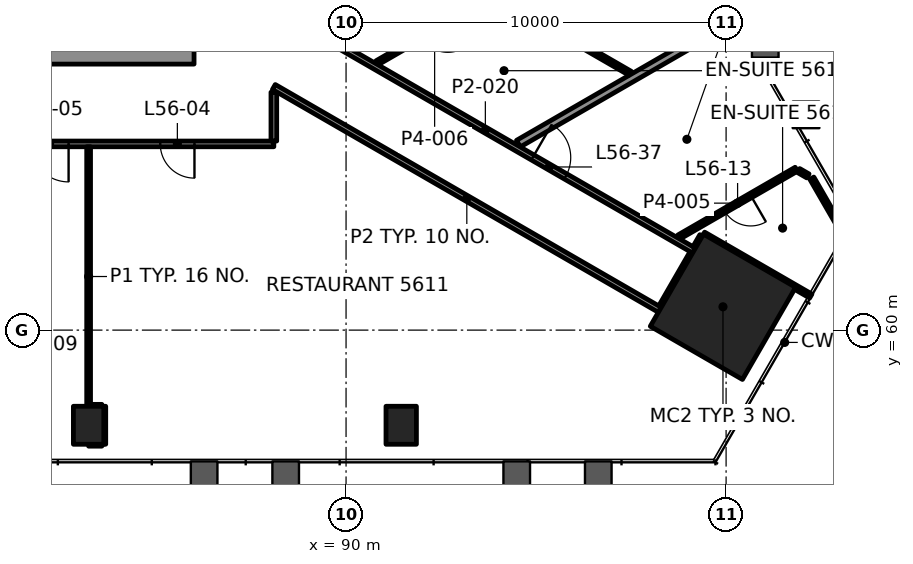
"""IFC4 building model, lengths in metres.
Left out: names, types, materials, properties, quantities, classifications, styles, units other than length and angle.
Written with IfcOpenShell. Run it as: python <this file> out.ifc"""

import sys

from ifc_helpers import new_model, si_unit, direction, frame, frame_2d, origin, origin_2d, place, context, subcontext, project, spatial, rectangle, hollow_rectangle, extrude, element, fill, save


model = new_model("IFC4")
c1 = context("Model", 3, precision=1e-05, world=origin(), true_north=direction((0.0, 1.0)))
c2 = subcontext(c1, "Body", "Model", "MODEL_VIEW")
j1 = project(units=[si_unit("LENGTHUNIT", "METRE"), si_unit("PLANEANGLEUNIT", "RADIAN")], contexts=[c1])
p1 = place(None, origin())
s1 = spatial("IfcSite", under=j1, at=p1, CompositionType="ELEMENT")
p2 = place(p1, origin())
s2 = spatial("IfcBuilding", under=s1, at=p2, CompositionType="ELEMENT")
p3 = place(p2, frame((0.0, 0.0, 237.7)))
s3 = spatial("IfcBuildingStorey", under=s2, at=p3, CompositionType="ELEMENT", Elevation=237.7)
p4 = place(p3, frame((99.918, 60.614, 0.0), z_axis=(0.0, 0.0, 1.0), x_axis=(0.5, 0.866025403784, 0.0)))
e1 = element("IfcColumn", 1, at=p4, inside=s3, PredefinedType="COLUMN", context=c2, shape_type="SweptSolid", body=[
    extrude(rectangle(XDim=2.8, YDim=2.8, at=origin_2d()), origin(), (0.0, 0.0, 1.0), 3.9),
])
for number, where, z_axis, x_axis in (
    (2, (83.226, 57.496, -0.0), (0.0, 0.0, 1.0), (1.0, 0.0, 0.0)),
    (3, (91.451, 57.496, -0.0), (0.0, 0.0, 1.0), (1.0, 0.0, 0.0)),
):
    element("IfcColumn", number, at=place(p3, frame(where, z_axis=z_axis, x_axis=x_axis)), inside=s3, PredefinedType="COLUMN", context=c2, shape_type="SweptSolid", body=[
        extrude(hollow_rectangle(XDim=0.8, YDim=1.0, WallThickness=0.05, at=origin_2d()), origin(), (0.0, 0.0, 1.0), 3.9),
    ])
p5 = place(p3, frame((64.0, 67.375, 0.0), z_axis=(0.0, 0.0, 1.0), x_axis=(1.0, 0.0, 0.0)))
e4 = element("IfcWall", 4, at=p5, inside=s3, PredefinedType="SHEAR", context=c2, shape_type="SweptSolid", body=[
    extrude(rectangle(XDim=22.0, YDim=0.75, at=frame_2d((11.0, 0.0))), origin(), (0.0, 0.0, 1.0), 3.6),
])
p6 = place(p5, frame((1.575, 0.0, 0.0)))
e5 = element("IfcOpeningElement", 5, at=p6, cuts=e4, PredefinedType="OPENING", context=c2, shape_type="SweptSolid", body=[
    extrude(rectangle(XDim=0.9, YDim=2.1, at=frame_2d((0.45, 1.05))), frame((0.0, 0.385, 0.0), z_axis=(0.0, -1.0, 0.0), x_axis=(1.0, 0.0, 0.0)), (0.0, 0.0, 1.0), 0.77),
])
p7 = place(p5, frame((4.425, 0.0, 0.0)))
e6 = element("IfcOpeningElement", 6, at=p7, cuts=e4, PredefinedType="OPENING", context=c2, shape_type="SweptSolid", body=[
    extrude(rectangle(XDim=0.9, YDim=2.1, at=frame_2d((0.45, 1.05))), frame((0.0, 0.385, 0.0), z_axis=(0.0, -1.0, 0.0), x_axis=(1.0, 0.0, 0.0)), (0.0, 0.0, 1.0), 0.77),
])
p8 = place(p3, frame((83.226, 56.996, 0.0), z_axis=(0.0, 0.0, 1.0), x_axis=(1.0, 0.0, 0.0)))
e7 = element("IfcWall", 7, at=p8, inside=s3, PredefinedType="PARTITIONING", context=c2, shape_type="SweptSolid", body=[
    extrude(rectangle(XDim=0.349, YDim=0.1, at=frame_2d((0.175, 0.0))), origin(), (0.0, 0.0, 1.0), 3.0),
])
p9 = place(p3, frame((83.286, 57.996, 0.0), z_axis=(0.0, 0.0, 1.0), x_axis=(1.0, 0.0, 0.0)))
e8 = element("IfcWall", 8, at=p9, inside=s3, PredefinedType="PARTITIONING", context=c2, shape_type="SweptSolid", body=[
    extrude(rectangle(XDim=0.289, YDim=0.1, at=frame_2d((0.145, 0.0))), origin(), (0.0, 0.0, 1.0), 3.0),
])
p10 = place(p3, frame((88.099, 64.9, 0.0), z_axis=(0.0, 0.0, 1.0), x_axis=(-1.0, 0.0, 0.0)))
e9 = element("IfcWall", 9, at=p10, inside=s3, PredefinedType="PARTITIONING", context=c2, shape_type="SweptSolid", body=[
    extrude(rectangle(XDim=26.199, YDim=0.15, at=frame_2d((13.1, 0.0))), origin(), (0.0, 0.0, 1.0), 3.0),
])
p11 = place(p10, frame((2.088, 0.0, 0.0)))
e10 = element("IfcOpeningElement", 10, at=p11, cuts=e9, PredefinedType="OPENING", context=c2, shape_type="SweptSolid", body=[
    extrude(rectangle(XDim=0.9, YDim=2.1, at=frame_2d((0.45, 1.05))), frame((0.0, 0.085, 0.0), z_axis=(0.0, -1.0, 0.0), x_axis=(1.0, 0.0, 0.0)), (0.0, 0.0, 1.0), 0.17),
])
p12 = place(p10, frame((5.4, 0.0, 0.0)))
e11 = element("IfcOpeningElement", 11, at=p12, cuts=e9, PredefinedType="OPENING", context=c2, shape_type="SweptSolid", body=[
    extrude(rectangle(XDim=1.0, YDim=2.1, at=frame_2d((0.5, 1.05))), frame((0.0, 0.085, 0.0), z_axis=(0.0, -1.0, 0.0), x_axis=(1.0, 0.0, 0.0)), (0.0, 0.0, 1.0), 0.17),
])
p13 = place(p10, frame((17.946, 0.0, 0.0)))
e12 = element("IfcOpeningElement", 12, at=p13, cuts=e9, PredefinedType="OPENING", context=c2, shape_type="SweptSolid", body=[
    extrude(rectangle(XDim=1.0, YDim=2.1, at=frame_2d((0.5, 1.05))), frame((0.0, 0.085, 0.0), z_axis=(0.0, -1.0, 0.0), x_axis=(1.0, 0.0, 0.0)), (0.0, 0.0, 1.0), 0.17),
])
p14 = place(p10, frame((24.395, 0.0, 0.0)))
e13 = element("IfcOpeningElement", 13, at=p14, cuts=e9, PredefinedType="OPENING", context=c2, shape_type="SweptSolid", body=[
    extrude(rectangle(XDim=1.0, YDim=2.1, at=frame_2d((0.5, 1.05))), frame((0.0, 0.085, 0.0), z_axis=(0.0, -1.0, 0.0), x_axis=(1.0, 0.0, 0.0)), (0.0, 0.0, 1.0), 0.17),
])
p15 = place(p3, frame((101.848, 64.234, 0.0), z_axis=(0.0, 0.0, 1.0), x_axis=(-0.865998731726, -0.500046194516, 0.0)))
e14 = element("IfcWall", 14, at=p15, inside=s3, PredefinedType="PARTITIONING", context=c2, shape_type="SweptSolid", body=[
    extrude(rectangle(XDim=3.569, YDim=0.12, at=frame_2d((1.784, 0.0))), origin(), (0.0, 0.0, 1.0), 3.0),
])
p16 = place(p15, frame((1.384, 0.0, 0.0)))
e15 = element("IfcOpeningElement", 15, at=p16, cuts=e14, PredefinedType="OPENING", context=c2, shape_type="SweptSolid", body=[
    extrude(rectangle(XDim=0.8, YDim=2.1, at=frame_2d((0.4, 1.05))), frame((0.0, 0.07, 0.0), z_axis=(0.0, -1.0, 0.0), x_axis=(1.0, 0.0, 0.0)), (0.0, 0.0, 1.0), 0.14),
])
p17 = place(p3, frame((94.535, 64.907, 0.0), z_axis=(0.0, 0.0, 1.0), x_axis=(0.866024015056, 0.50000240534, 0.0)))
e16 = element("IfcWall", 16, at=p17, inside=s3, PredefinedType="PARTITIONING", context=c2, shape_type="SweptSolid", body=[
    extrude(rectangle(XDim=6.593, YDim=0.2, at=frame_2d((3.296, 0.0))), origin(), (0.0, 0.0, 1.0), 3.0),
])
p18 = place(p3, frame((93.846, 68.784, 0.0), z_axis=(0.0, 0.0, 1.0), x_axis=(-0.865997352085, -0.500048583822, 0.0)))
e17 = element("IfcWall", 17, at=p18, inside=s3, PredefinedType="PARTITIONING", context=c2, shape_type="SweptSolid", body=[
    extrude(rectangle(XDim=3.499, YDim=0.12, at=frame_2d((1.75, 0.0))), origin(), (0.0, 0.0, 1.0), 3.0),
])
p19 = place(p18, frame((1.35, 0.0, 0.0)))
e18 = element("IfcOpeningElement", 18, at=p19, cuts=e17, PredefinedType="OPENING", context=c2, shape_type="SweptSolid", body=[
    extrude(rectangle(XDim=0.8, YDim=2.1, at=frame_2d((0.4, 1.05))), frame((0.0, 0.07, 0.0), z_axis=(0.0, -1.0, 0.0), x_axis=(1.0, 0.0, 0.0)), (0.0, 0.0, 1.0), 0.14),
])
p20 = place(p3, frame((98.293, 60.6, 0.0), z_axis=(0.0, 0.0, 1.0), x_axis=(0.499927431592, 0.866067297121, 0.0)))
e19 = element("IfcWall", 19, at=p20, inside=s3, PredefinedType="PARTITIONING", context=c2, shape_type="SweptSolid", body=[
    extrude(rectangle(XDim=1.65, YDim=0.15, at=frame_2d((0.825, 0.0))), origin(), (0.0, 0.0, 1.0), 2.847),
])
p21 = place(p3, frame((88.1, 64.976, 0.0), z_axis=(0.0, 0.0, 1.0), x_axis=(0.0, 1.0, 0.0)))
e20 = element("IfcWall", 20, at=p21, inside=s3, PredefinedType="PARTITIONING", context=c2, shape_type="SweptSolid", body=[
    extrude(rectangle(XDim=1.285, YDim=0.15, at=frame_2d((0.643, 0.0))), origin(), (0.0, 0.0, 1.0), 2.847),
])
p22 = place(p3, frame((83.626, 56.997, 0.0), z_axis=(0.0, 0.0, 1.0), x_axis=(0.0, 1.0, 0.0)))
e21 = element("IfcWall", 21, at=p22, inside=s3, PredefinedType="PARTITIONING", context=c2, shape_type="SweptSolid", body=[
    extrude(rectangle(XDim=0.999, YDim=0.1, at=frame_2d((0.5, 0.0))), origin(), (0.0, 0.0, 1.0), 2.922),
])
p23 = place(p3, frame((83.226, 57.996, 0.0), z_axis=(0.0, 0.0, 1.0), x_axis=(0.0, 1.0, 0.0)))
e22 = element("IfcWall", 22, at=p23, inside=s3, PredefinedType="PARTITIONING", context=c2, shape_type="SweptSolid", body=[
    extrude(rectangle(XDim=6.829, YDim=0.1, at=frame_2d((3.415, 0.0))), origin(), (0.0, 0.0, 1.0), 3.0),
])
p24 = place(p3, frame((103.138, 62.471, 0.0), z_axis=(0.0, 0.0, 1.0), x_axis=(-0.499998282143, 0.866026395587, 0.0)))
e23 = element("IfcWall", 23, at=p24, inside=s3, PredefinedType="PARTITIONING", context=c2, shape_type="SweptSolid", body=[
    extrude(rectangle(XDim=1.762, YDim=0.12, at=frame_2d((0.881, 0.0))), origin(), (0.0, 0.0, 1.0), 3.0),
])
p25 = place(p3, frame((102.153, 64.058, 0.0), z_axis=(0.0, 0.0, 1.0), x_axis=(-0.866113839764, 0.499846793097, 0.0)))
e24 = element("IfcWall", 24, at=p25, inside=s3, PredefinedType="PARTITIONING", context=c2, shape_type="SweptSolid", body=[
    extrude(rectangle(XDim=0.283, YDim=0.12, at=frame_2d((0.142, 0.0))), origin(), (0.0, 0.0, 1.0), 3.0),
])
p26 = place(p3, frame((97.473, 66.76, 0.0), z_axis=(0.0, 0.0, 1.0), x_axis=(-0.866027647951, 0.499996112969, 0.0)))
e25 = element("IfcWall", 25, at=p26, inside=s3, PredefinedType="PARTITIONING", context=c2, shape_type="SweptSolid", body=[
    extrude(rectangle(XDim=4.119, YDim=0.12, at=frame_2d((2.059, 0.0))), origin(), (0.0, 0.0, 1.0), 3.0),
])
p27 = place(p3, frame((102.229, 60.896, 0.0), z_axis=(0.0, 0.0, 1.0), x_axis=(-0.866054628924, 0.499949377157, 0.0)))
e26 = element("IfcWall", 26, at=p27, inside=s3, PredefinedType="PARTITIONING", context=c2, shape_type="SweptSolid", body=[
    extrude(rectangle(XDim=3.26, YDim=0.12, at=frame_2d((1.63, 0.0))), origin(), (0.0, 0.0, 1.0), 3.0),
])
p28 = place(p3, frame((88.175, 68.433, 0.0), z_axis=(0.0, 0.0, 1.0), x_axis=(0.866028141608, -0.499995257921, 0.0)))
e27 = element("IfcWall", 27, at=p28, inside=s3, PredefinedType="PARTITIONING", context=c2, shape_type="SweptSolid", body=[
    extrude(rectangle(XDim=12.679, YDim=0.15, at=frame_2d((6.339, 0.0))), origin(), (0.0, 0.0, 1.0), 3.0),
])
p29 = place(p28, frame((7.779, 0.0, 0.0)))
e28 = element("IfcOpeningElement", 28, at=p29, cuts=e27, PredefinedType="OPENING", context=c2, shape_type="SweptSolid", body=[
    extrude(rectangle(XDim=1.0, YDim=2.1, at=frame_2d((0.5, 1.05))), frame((0.0, 0.085, 0.0), z_axis=(0.0, -1.0, 0.0), x_axis=(1.0, 0.0, 0.0)), (0.0, 0.0, 1.0), 0.17),
])
p30 = place(p3, frame((98.255, 60.535, 0.0), z_axis=(0.0, 0.0, 1.0), x_axis=(-0.866028172479, 0.49999520445, 0.0)))
e29 = element("IfcWall", 29, at=p30, inside=s3, PredefinedType="PARTITIONING", context=c2, shape_type="SweptSolid", body=[
    extrude(rectangle(XDim=11.726, YDim=0.15, at=frame_2d((5.863, 0.0))), origin(), (0.0, 0.0, 1.0), 2.847),
])
p31 = place(p3, frame((99.192, 62.158, 0.0), z_axis=(0.0, 0.0, 1.0), x_axis=(0.500534336868, 0.865716684381, 0.0)))
e30 = element("IfcWall", 30, at=p31, inside=s3, PredefinedType="PARTITIONING", context=c2, shape_type="SweptSolid", body=[
    extrude(rectangle(XDim=0.364, YDim=0.15, at=frame_2d((0.182, 0.0))), origin(), (0.0, 0.0, 1.0), 3.0),
])
p32 = place(p11, origin())
e31 = element("IfcDoor", 31, at=p32, inside=s3, OperationType="SINGLE_SWING_LEFT", PredefinedType="DOOR", context=c2, shape_type="SweptSolid", body=[
    extrude(rectangle(XDim=0.9, YDim=2.1, at=frame_2d((0.45, 1.05))), frame((0.0, 0.025, 0.0), z_axis=(0.0, -1.0, 0.0), x_axis=(1.0, 0.0, 0.0)), (0.0, 0.0, 1.0), 0.05),
])
fill(e10, e31)
p33 = place(p12, origin())
e32 = element("IfcDoor", 32, at=p33, inside=s3, OperationType="SINGLE_SWING_LEFT", PredefinedType="DOOR", context=c2, shape_type="SweptSolid", body=[
    extrude(rectangle(XDim=1.0, YDim=2.1, at=frame_2d((0.5, 1.05))), frame((0.0, 0.025, 0.0), z_axis=(0.0, -1.0, 0.0), x_axis=(1.0, 0.0, 0.0)), (0.0, 0.0, 1.0), 0.05),
])
fill(e11, e32)
p34 = place(p16, origin())
e33 = element("IfcDoor", 33, at=p34, inside=s3, OperationType="SINGLE_SWING_LEFT", PredefinedType="DOOR", context=c2, shape_type="SweptSolid", body=[
    extrude(rectangle(XDim=0.8, YDim=2.1, at=frame_2d((0.4, 1.05))), frame((0.0, 0.025, 0.0), z_axis=(0.0, -1.0, 0.0), x_axis=(1.0, 0.0, 0.0)), (0.0, 0.0, 1.0), 0.05),
])
fill(e15, e33)
p35 = place(p29, origin())
e34 = element("IfcDoor", 34, at=p35, inside=s3, OperationType="SINGLE_SWING_RIGHT", PredefinedType="DOOR", context=c2, shape_type="SweptSolid", body=[
    extrude(rectangle(XDim=1.0, YDim=2.1, at=frame_2d((0.5, 1.05))), frame((0.0, 0.025, 0.0), z_axis=(0.0, -1.0, 0.0), x_axis=(1.0, 0.0, 0.0)), (0.0, 0.0, 1.0), 0.05),
])
fill(e28, e34)
save(model, sys.argv[1])
